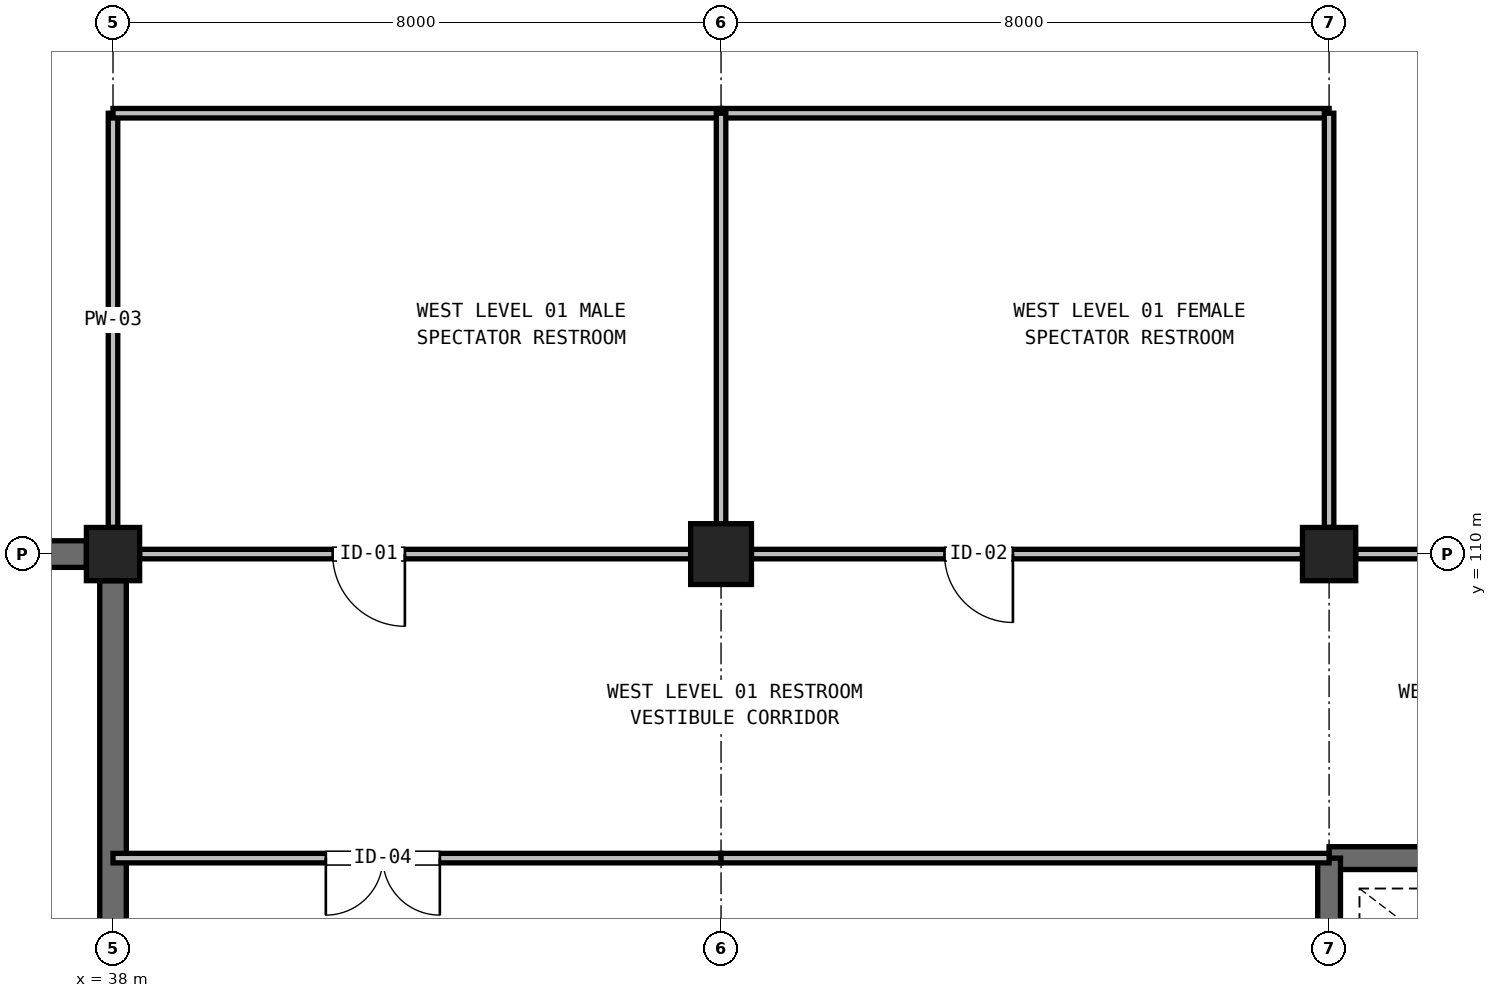
"""IFC4 building model, lengths in metres.
Left out: names, types, materials, properties, quantities, classifications, styles, units other than length and angle.
Written with IfcOpenShell. Run it as: python <this file> out.ifc"""

import sys

from ifc_helpers import new_model, si_unit, direction, frame, frame_2d, origin, origin_2d, place, context, subcontext, project, spatial, rectangle, extrude, element, fill, save


model = new_model("IFC4")
c1 = context("Model", 3, precision=1e-05, world=origin(), true_north=direction((0.0, 1.0)))
c2 = subcontext(c1, "Body", "Model", "MODEL_VIEW")
j1 = project(units=[si_unit("LENGTHUNIT", "METRE"), si_unit("PLANEANGLEUNIT", "RADIAN")], contexts=[c1])
p1 = place(None, origin())
s1 = spatial("IfcSite", under=j1, at=p1, CompositionType="ELEMENT")
p2 = place(p1, origin())
s2 = spatial("IfcBuilding", under=s1, at=p2, CompositionType="ELEMENT")
p3 = place(p2, frame((0.0, 0.0, 5.4)))
s3 = spatial("IfcBuildingStorey", under=s2, at=p3, CompositionType="ELEMENT", Elevation=5.4)
p4 = place(p3, frame((38.0, 110.0, 0.0), z_axis=(0.0, 0.0, 1.0), x_axis=(1.0, 0.0, 0.0)))
e1 = element("IfcColumn", 1, at=p4, inside=s3, PredefinedType="COLUMN", context=c2, shape_type="SweptSolid", body=[
    extrude(rectangle(XDim=0.7, YDim=0.7, at=origin_2d()), origin(), (0.0, 0.0, 1.0), 5.4),
])
p5 = place(p3, frame((46.0, 110.0, 0.0), z_axis=(0.0, 0.0, 1.0), x_axis=(1.0, 0.0, 0.0)))
e2 = element("IfcColumn", 2, at=p5, inside=s3, PredefinedType="COLUMN", context=c2, shape_type="SweptSolid", body=[
    extrude(rectangle(XDim=0.8, YDim=0.8, at=origin_2d()), origin(), (0.0, 0.0, 1.0), 5.4),
])
p6 = place(p3, frame((54.0, 110.0, 0.0), z_axis=(0.0, 0.0, 1.0), x_axis=(1.0, 0.0, 0.0)))
e3 = element("IfcColumn", 3, at=p6, inside=s3, PredefinedType="COLUMN", context=c2, shape_type="SweptSolid", body=[
    extrude(rectangle(XDim=0.7, YDim=0.7, at=origin_2d()), origin(), (0.0, 0.0, 1.0), 5.4),
])
for number, where, z_axis, x_axis in (
    (4, (30.375, 110.0, 0.0), (0.0, 0.0, 1.0), (1.0, 0.0, 0.0)),
    (5, (38.0, 102.375, 0.0), (0.0, 0.0, 1.0), (0.0, 1.0, 0.0)),
):
    element("IfcWall", number, at=place(p3, frame(where, z_axis=z_axis, x_axis=x_axis)), inside=s3, PredefinedType="SHEAR", context=c2, shape_type="SweptSolid", body=[
        extrude(rectangle(XDim=7.275, YDim=0.35, at=frame_2d((3.637, 0.0))), origin(), (0.0, 0.0, 1.0), 5.18),
    ])
p7 = place(p3, frame((54.0, 106.0, 0.0), z_axis=(0.0, 0.0, 1.0), x_axis=(1.0, 0.0, 0.0)))
e6 = element("IfcWall", 6, at=p7, inside=s3, PredefinedType="SHEAR", context=c2, shape_type="SweptSolid", body=[
    extrude(rectangle(XDim=8.0, YDim=0.3, at=frame_2d((4.0, 0.0))), origin(), (0.0, 0.0, 1.0), 5.18),
])
p8 = place(p3, frame((54.0, 102.375, 0.0), z_axis=(0.0, 0.0, 1.0), x_axis=(0.0, 1.0, 0.0)))
e7 = element("IfcWall", 7, at=p8, inside=s3, PredefinedType="SHEAR", context=c2, shape_type="SweptSolid", body=[
    extrude(rectangle(XDim=3.625, YDim=0.3, at=frame_2d((1.812, 0.0))), origin(), (0.0, 0.0, 1.0), 5.18),
])
p9 = place(p3, frame((38.0, 110.35, 0.0), z_axis=(0.0, 0.0, 1.0), x_axis=(0.0, 1.0, 0.0)))
e8 = element("IfcWall", 8, at=p9, inside=s3, PredefinedType="PARTITIONING", context=c2, shape_type="SweptSolid", body=[
    extrude(rectangle(XDim=5.45, YDim=0.125, at=frame_2d((2.725, 0.0))), origin(), (0.0, 0.0, 1.0), 4.54),
])
p10 = place(p3, frame((38.0, 106.0, 0.0), z_axis=(0.0, 0.0, 1.0), x_axis=(1.0, 0.0, 0.0)))
e9 = element("IfcWall", 9, at=p10, inside=s3, PredefinedType="PARTITIONING", context=c2, shape_type="SweptSolid", body=[
    extrude(rectangle(XDim=8.0, YDim=0.125, at=frame_2d((4.0, 0.0))), origin(), (0.0, 0.0, 1.0), 5.1),
])
p11 = place(p10, frame((2.8, 0.0, 0.0)))
e10 = element("IfcOpeningElement", 10, at=p11, cuts=e9, PredefinedType="OPENING", context=c2, shape_type="SweptSolid", body=[
    extrude(rectangle(XDim=1.5, YDim=2.2, at=frame_2d((0.75, 1.1))), frame((0.0, 0.073, 0.0), z_axis=(0.0, -1.0, 0.0), x_axis=(1.0, 0.0, 0.0)), (0.0, 0.0, 1.0), 0.145),
])
p12 = place(p3, frame((46.0, 106.0, 0.0), z_axis=(0.0, 0.0, 1.0), x_axis=(1.0, 0.0, 0.0)))
e11 = element("IfcWall", 11, at=p12, inside=s3, PredefinedType="PARTITIONING", context=c2, shape_type="SweptSolid", body=[
    extrude(rectangle(XDim=8.0, YDim=0.125, at=frame_2d((4.0, 0.0))), origin(), (0.0, 0.0, 1.0), 5.1),
])
p13 = place(p3, frame((38.35, 110.0, 0.0), z_axis=(0.0, 0.0, 1.0), x_axis=(1.0, 0.0, 0.0)))
e12 = element("IfcWall", 12, at=p13, inside=s3, PredefinedType="PARTITIONING", context=c2, shape_type="SweptSolid", body=[
    extrude(rectangle(XDim=7.25, YDim=0.125, at=frame_2d((3.625, 0.0))), origin(), (0.0, 0.0, 1.0), 4.42),
])
p14 = place(p13, frame((2.54, 0.0, 0.0)))
e13 = element("IfcOpeningElement", 13, at=p14, cuts=e12, PredefinedType="OPENING", context=c2, shape_type="SweptSolid", body=[
    extrude(rectangle(XDim=0.95, YDim=2.1, at=frame_2d((0.475, 1.05))), frame((0.0, 0.073, 0.0), z_axis=(0.0, -1.0, 0.0), x_axis=(1.0, 0.0, 0.0)), (0.0, 0.0, 1.0), 0.145),
])
p15 = place(p3, frame((46.4, 110.0, 0.0), z_axis=(0.0, 0.0, 1.0), x_axis=(1.0, 0.0, 0.0)))
e14 = element("IfcWall", 14, at=p15, inside=s3, PredefinedType="PARTITIONING", context=c2, shape_type="SweptSolid", body=[
    extrude(rectangle(XDim=7.25, YDim=0.125, at=frame_2d((3.625, 0.0))), origin(), (0.0, 0.0, 1.0), 4.36),
])
p16 = place(p15, frame((2.54, 0.0, 0.0)))
e15 = element("IfcOpeningElement", 15, at=p16, cuts=e14, PredefinedType="OPENING", context=c2, shape_type="SweptSolid", body=[
    extrude(rectangle(XDim=0.9, YDim=2.1, at=frame_2d((0.45, 1.05))), frame((0.0, 0.073, 0.0), z_axis=(0.0, -1.0, 0.0), x_axis=(1.0, 0.0, 0.0)), (0.0, 0.0, 1.0), 0.145),
])
p17 = place(p3, frame((54.35, 110.0, 0.0), z_axis=(0.0, 0.0, 1.0), x_axis=(1.0, 0.0, 0.0)))
e16 = element("IfcWall", 16, at=p17, inside=s3, PredefinedType="PARTITIONING", context=c2, shape_type="SweptSolid", body=[
    extrude(rectangle(XDim=11.65, YDim=0.125, at=frame_2d((5.825, 0.0))), origin(), (0.0, 0.0, 1.0), 4.49),
])
for number, where, z_axis, x_axis in (
    (17, (38.0, 115.8, 0.0), (0.0, 0.0, 1.0), (1.0, 0.0, 0.0)),
    (18, (46.0, 115.8, 0.0), (0.0, 0.0, 1.0), (1.0, 0.0, 0.0)),
):
    element("IfcWall", number, at=place(p3, frame(where, z_axis=z_axis, x_axis=x_axis)), inside=s3, PredefinedType="PARTITIONING", context=c2, shape_type="SweptSolid", body=[
        extrude(rectangle(XDim=8.0, YDim=0.125, at=frame_2d((4.0, 0.0))), origin(), (0.0, 0.0, 1.0), 5.1),
    ])
p18 = place(p3, frame((46.0, 110.4, 0.0), z_axis=(0.0, 0.0, 1.0), x_axis=(0.0, 1.0, 0.0)))
e19 = element("IfcWall", 19, at=p18, inside=s3, PredefinedType="PARTITIONING", context=c2, shape_type="SweptSolid", body=[
    extrude(rectangle(XDim=5.4, YDim=0.125, at=frame_2d((2.7, 0.0))), origin(), (0.0, 0.0, 1.0), 4.34),
])
p19 = place(p3, frame((54.0, 110.35, 0.0), z_axis=(0.0, 0.0, 1.0), x_axis=(0.0, 1.0, 0.0)))
e20 = element("IfcWall", 20, at=p19, inside=s3, PredefinedType="PARTITIONING", context=c2, shape_type="SweptSolid", body=[
    extrude(rectangle(XDim=5.45, YDim=0.125, at=frame_2d((2.725, 0.0))), origin(), (0.0, 0.0, 1.0), 4.49),
])
p20 = place(p11, frame((1.5, 0.0, 0.0), z_axis=(0.0, 0.0, 1.0), x_axis=(-1.0, 0.0, 0.0)))
e21 = element("IfcDoor", 21, at=p20, inside=s3, OperationType="DOUBLE_DOOR_SINGLE_SWING", PredefinedType="DOOR", context=c2, shape_type="SweptSolid", body=[
    extrude(rectangle(XDim=1.5, YDim=2.2, at=frame_2d((0.75, 1.1))), frame((0.0, 0.025, 0.0), z_axis=(0.0, -1.0, 0.0), x_axis=(1.0, 0.0, 0.0)), (0.0, 0.0, 1.0), 0.05),
])
fill(e10, e21)
p21 = place(p14, frame((0.95, 0.0, 0.0), z_axis=(0.0, 0.0, 1.0), x_axis=(-1.0, 0.0, 0.0)))
e22 = element("IfcDoor", 22, at=p21, inside=s3, OperationType="SINGLE_SWING_RIGHT", PredefinedType="DOOR", context=c2, shape_type="SweptSolid", body=[
    extrude(rectangle(XDim=0.95, YDim=2.1, at=frame_2d((0.475, 1.05))), frame((0.0, 0.025, 0.0), z_axis=(0.0, -1.0, 0.0), x_axis=(1.0, 0.0, 0.0)), (0.0, 0.0, 1.0), 0.05),
])
fill(e13, e22)
p22 = place(p16, frame((0.9, 0.0, 0.0), z_axis=(0.0, 0.0, 1.0), x_axis=(-1.0, 0.0, 0.0)))
e23 = element("IfcDoor", 23, at=p22, inside=s3, OperationType="SINGLE_SWING_RIGHT", PredefinedType="DOOR", context=c2, shape_type="SweptSolid", body=[
    extrude(rectangle(XDim=0.9, YDim=2.1, at=frame_2d((0.45, 1.05))), frame((0.0, 0.025, 0.0), z_axis=(0.0, -1.0, 0.0), x_axis=(1.0, 0.0, 0.0)), (0.0, 0.0, 1.0), 0.05),
])
fill(e15, e23)
save(model, sys.argv[1])
